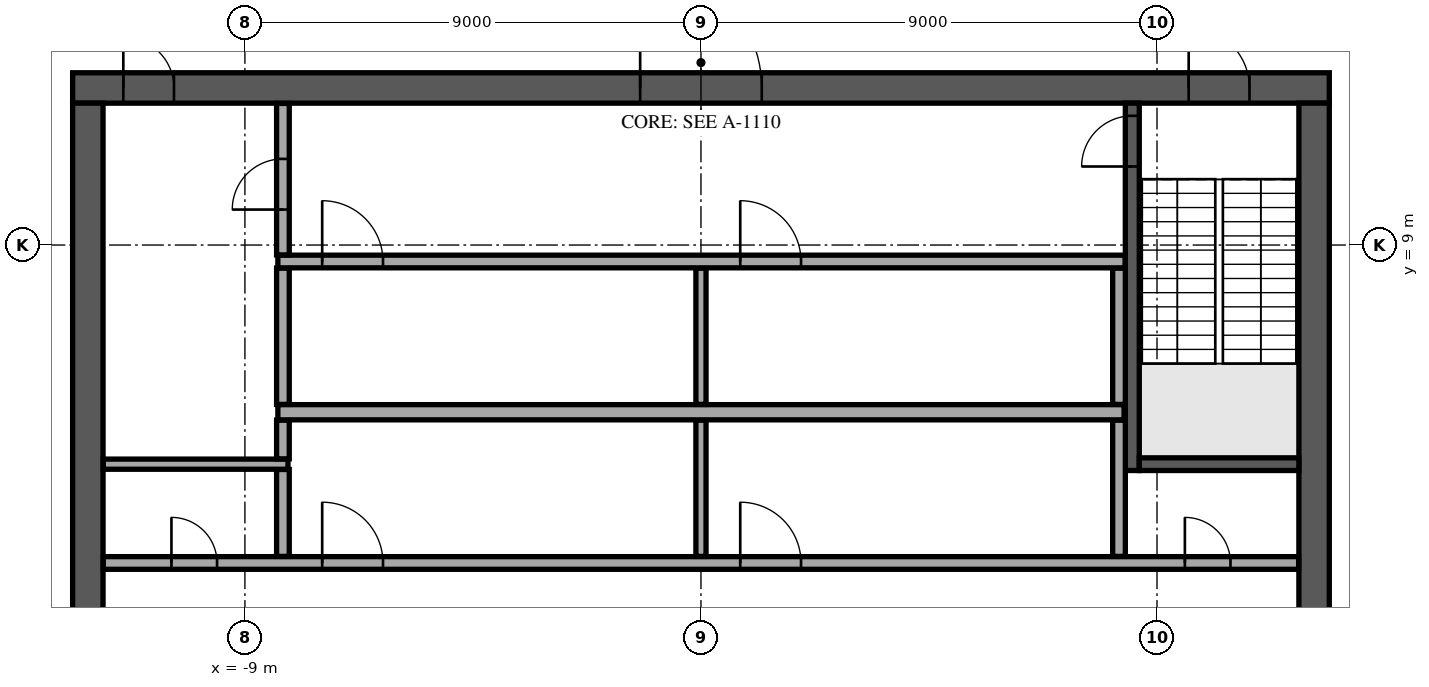
"""IFC4 building model, lengths in metres.
Left out: names, types, materials, properties, quantities, classifications, styles, units other than length and angle.
Written with IfcOpenShell. Run it as: python <this file> out.ifc"""

import sys

from ifc_helpers import new_model, si_unit, direction, frame, frame_2d, origin, place, context, subcontext, project, spatial, rectangle, extrude, element, fill, save


model = new_model("IFC4")
c1 = context("Model", 3, precision=1e-05, world=origin(), true_north=direction((0.0, 1.0)))
c2 = subcontext(c1, "Body", "Model", "MODEL_VIEW")
j1 = project(units=[si_unit("LENGTHUNIT", "METRE"), si_unit("PLANEANGLEUNIT", "RADIAN")], contexts=[c1])
p1 = place(None, origin())
s1 = spatial("IfcSite", under=j1, at=p1, CompositionType="ELEMENT")
p2 = place(p1, origin())
s2 = spatial("IfcBuilding", under=s1, at=p2, CompositionType="ELEMENT")
p3 = place(p2, frame((0.0, 0.0, 358.1)))
s3 = spatial("IfcBuildingStorey", under=s2, at=p3, CompositionType="ELEMENT", Elevation=358.1)
p4 = place(p3, frame((-12.4, 12.1, 0.0), z_axis=(0.0, 0.0, 1.0), x_axis=(1.0, 0.0, 0.0)))
e1 = element("IfcWall", 1, at=p4, inside=s3, PredefinedType="SHEAR", context=c2, shape_type="SweptSolid", body=[
    extrude(rectangle(XDim=24.8, YDim=0.6, at=frame_2d((12.4, 0.0))), origin(), (0.0, 0.0, 1.0), 4.7),
])
p5 = place(p4, frame((11.2, 0.0, 0.0)))
e2 = element("IfcOpeningElement", 2, at=p5, cuts=e1, PredefinedType="OPENING", context=c2, shape_type="SweptSolid", body=[
    extrude(rectangle(XDim=2.4, YDim=2.4, at=frame_2d((1.2, 1.2))), frame((0.0, 0.31, 0.0), z_axis=(0.0, -1.0, 0.0), x_axis=(1.0, 0.0, 0.0)), (0.0, 0.0, 1.0), 0.62),
])
p6 = place(p4, frame((22.025, 0.0, 0.0)))
e3 = element("IfcOpeningElement", 3, at=p6, cuts=e1, PredefinedType="OPENING", context=c2, shape_type="SweptSolid", body=[
    extrude(rectangle(XDim=1.2, YDim=2.1, at=frame_2d((0.6, 1.05))), frame((0.0, 0.31, 0.0), z_axis=(0.0, -1.0, 0.0), x_axis=(1.0, 0.0, 0.0)), (0.0, 0.0, 1.0), 0.62),
])
p7 = place(p4, frame((1.0, 0.0, 0.0)))
e4 = element("IfcOpeningElement", 4, at=p7, cuts=e1, PredefinedType="OPENING", context=c2, shape_type="SweptSolid", body=[
    extrude(rectangle(XDim=1.0, YDim=2.1, at=frame_2d((0.5, 1.05))), frame((0.0, 0.31, 0.0), z_axis=(0.0, -1.0, 0.0), x_axis=(1.0, 0.0, 0.0)), (0.0, 0.0, 1.0), 0.62),
])
p8 = place(p3, frame((12.1, -11.8, 0.0), z_axis=(0.0, 0.0, 1.0), x_axis=(0.0, 1.0, 0.0)))
e5 = element("IfcWall", 5, at=p8, inside=s3, PredefinedType="SHEAR", context=c2, shape_type="SweptSolid", body=[
    extrude(rectangle(XDim=23.6, YDim=0.6, at=frame_2d((11.8, 0.0))), origin(), (0.0, 0.0, 1.0), 4.7),
])
p9 = place(p8, frame((10.6, 0.0, 0.0)))
e6 = element("IfcOpeningElement", 6, at=p9, cuts=e5, PredefinedType="OPENING", context=c2, shape_type="SweptSolid", body=[
    extrude(rectangle(XDim=2.4, YDim=2.4, at=frame_2d((1.2, 1.2))), frame((0.0, 0.31, 0.0), z_axis=(0.0, -1.0, 0.0), x_axis=(1.0, 0.0, 0.0)), (0.0, 0.0, 1.0), 0.62),
])
p10 = place(p3, frame((-12.1, -11.8, 0.0), z_axis=(0.0, 0.0, 1.0), x_axis=(0.0, 1.0, 0.0)))
e7 = element("IfcWall", 7, at=p10, inside=s3, PredefinedType="SHEAR", context=c2, shape_type="SweptSolid", body=[
    extrude(rectangle(XDim=23.6, YDim=0.6, at=frame_2d((11.8, 0.0))), origin(), (0.0, 0.0, 1.0), 4.7),
])
p11 = place(p10, frame((10.6, 0.0, 0.0)))
e8 = element("IfcOpeningElement", 8, at=p11, cuts=e7, PredefinedType="OPENING", context=c2, shape_type="SweptSolid", body=[
    extrude(rectangle(XDim=2.4, YDim=2.4, at=frame_2d((1.2, 1.2))), frame((0.0, 0.31, 0.0), z_axis=(0.0, -1.0, 0.0), x_axis=(1.0, 0.0, 0.0)), (0.0, 0.0, 1.0), 0.62),
])
p12 = place(p3, frame((8.512, 4.55, 0.0), z_axis=(0.0, 0.0, 1.0), x_axis=(0.0, 1.0, 0.0)))
e9 = element("IfcWall", 9, at=p12, inside=s3, PredefinedType="SOLIDWALL", context=c2, shape_type="SweptSolid", body=[
    extrude(rectangle(XDim=7.25, YDim=0.275, at=frame_2d((3.625, 0.0))), origin(), (0.0, 0.0, 1.0), 4.7),
])
p13 = place(p12, frame((6.0, 0.0, 0.0)))
e10 = element("IfcOpeningElement", 10, at=p13, cuts=e9, PredefinedType="OPENING", context=c2, shape_type="SweptSolid", body=[
    extrude(rectangle(XDim=1.0, YDim=2.1, at=frame_2d((0.5, 1.05))), frame((0.0, 0.147, 0.0), z_axis=(0.0, -1.0, 0.0), x_axis=(1.0, 0.0, 0.0)), (0.0, 0.0, 1.0), 0.295),
])
p14 = place(p3, frame((8.65, 4.675, 0.0), z_axis=(0.0, 0.0, 1.0), x_axis=(1.0, 0.0, 0.0)))
e11 = element("IfcWall", 11, at=p14, inside=s3, PredefinedType="SOLIDWALL", context=c2, shape_type="SweptSolid", body=[
    extrude(rectangle(XDim=3.15, YDim=0.25, at=frame_2d((1.575, 0.0))), origin(), (0.0, 0.0, 1.0), 4.7),
])
p15 = place(p3, frame((-11.795, 2.725, 0.0), z_axis=(0.0, 0.0, 1.0), x_axis=(1.0, 0.0, 0.0)))
e12 = element("IfcWall", 12, at=p15, inside=s3, PredefinedType="PARTITIONING", context=c2, shape_type="SweptSolid", body=[
    extrude(rectangle(XDim=23.59, YDim=0.25, at=frame_2d((11.795, 0.0))), origin(), (0.0, 0.0, 1.0), 4.7),
])
p16 = place(p15, frame((21.345, 0.0, 0.0)))
e13 = element("IfcOpeningElement", 13, at=p16, cuts=e12, PredefinedType="OPENING", context=c2, shape_type="SweptSolid", body=[
    extrude(rectangle(XDim=0.9, YDim=2.1, at=frame_2d((0.45, 1.05))), frame((0.0, 0.135, 0.0), z_axis=(0.0, -1.0, 0.0), x_axis=(1.0, 0.0, 0.0)), (0.0, 0.0, 1.0), 0.27),
])
p17 = place(p15, frame((1.345, 0.0, 0.0)))
e14 = element("IfcOpeningElement", 14, at=p17, cuts=e12, PredefinedType="OPENING", context=c2, shape_type="SweptSolid", body=[
    extrude(rectangle(XDim=0.9, YDim=2.1, at=frame_2d((0.45, 1.05))), frame((0.0, 0.135, 0.0), z_axis=(0.0, -1.0, 0.0), x_axis=(1.0, 0.0, 0.0)), (0.0, 0.0, 1.0), 0.27),
])
p18 = place(p15, frame((4.32, 0.0, 0.0)))
e15 = element("IfcOpeningElement", 15, at=p18, cuts=e12, PredefinedType="OPENING", context=c2, shape_type="SweptSolid", body=[
    extrude(rectangle(XDim=1.2, YDim=2.1, at=frame_2d((0.6, 1.05))), frame((0.0, 0.135, 0.0), z_axis=(0.0, -1.0, 0.0), x_axis=(1.0, 0.0, 0.0)), (0.0, 0.0, 1.0), 0.27),
])
p19 = place(p15, frame((12.57, 0.0, 0.0)))
e16 = element("IfcOpeningElement", 16, at=p19, cuts=e12, PredefinedType="OPENING", context=c2, shape_type="SweptSolid", body=[
    extrude(rectangle(XDim=1.2, YDim=2.1, at=frame_2d((0.6, 1.05))), frame((0.0, 0.135, 0.0), z_axis=(0.0, -1.0, 0.0), x_axis=(1.0, 0.0, 0.0)), (0.0, 0.0, 1.0), 0.27),
])
p20 = place(p3, frame((-8.25, 2.855, 0.0), z_axis=(0.0, 0.0, 1.0), x_axis=(0.0, 1.0, 0.0)))
e17 = element("IfcWall", 17, at=p20, inside=s3, PredefinedType="PARTITIONING", context=c2, shape_type="SweptSolid", body=[
    extrude(rectangle(XDim=1.715, YDim=0.25, at=frame_2d((0.857, 0.0))), origin(), (0.0, 0.0, 1.0), 4.7),
])
p21 = place(p3, frame((0.0, 2.855, 0.0), z_axis=(0.0, 0.0, 1.0), x_axis=(0.0, 1.0, 0.0)))
e18 = element("IfcWall", 18, at=p21, inside=s3, PredefinedType="PARTITIONING", context=c2, shape_type="SweptSolid", body=[
    extrude(rectangle(XDim=2.69, YDim=0.2, at=frame_2d((1.345, 0.0))), origin(), (0.0, 0.0, 1.0), 4.7),
])
p22 = place(p3, frame((8.25, 2.855, 0.0), z_axis=(0.0, 0.0, 1.0), x_axis=(0.0, 1.0, 0.0)))
e19 = element("IfcWall", 19, at=p22, inside=s3, PredefinedType="PARTITIONING", context=c2, shape_type="SweptSolid", body=[
    extrude(rectangle(XDim=2.69, YDim=0.25, at=frame_2d((1.345, 0.0))), origin(), (0.0, 0.0, 1.0), 4.7),
])
p23 = place(p3, frame((-11.795, 4.675, 0.0), z_axis=(0.0, 0.0, 1.0), x_axis=(1.0, 0.0, 0.0)))
e20 = element("IfcWall", 20, at=p23, inside=s3, PredefinedType="PARTITIONING", context=c2, shape_type="SweptSolid", body=[
    extrude(rectangle(XDim=3.645, YDim=0.2, at=frame_2d((1.823, 0.0))), origin(), (0.0, 0.0, 1.0), 4.7),
])
p24 = place(p3, frame((-8.25, 4.78, 0.0), z_axis=(0.0, 0.0, 1.0), x_axis=(0.0, 1.0, 0.0)))
e21 = element("IfcWall", 21, at=p24, inside=s3, PredefinedType="PARTITIONING", context=c2, shape_type="SweptSolid", body=[
    extrude(rectangle(XDim=0.765, YDim=0.25, at=frame_2d((0.382, 0.0))), origin(), (0.0, 0.0, 1.0), 4.7),
])
p25 = place(p3, frame((-8.35, 5.7, 0.0), z_axis=(0.0, 0.0, 1.0), x_axis=(1.0, 0.0, 0.0)))
e22 = element("IfcWall", 22, at=p25, inside=s3, PredefinedType="PARTITIONING", context=c2, shape_type="SweptSolid", body=[
    extrude(rectangle(XDim=16.7, YDim=0.3, at=frame_2d((8.35, 0.0))), origin(), (0.0, 0.0, 1.0), 4.7),
])
p26 = place(p3, frame((-8.25, 5.855, 0.0), z_axis=(0.0, 0.0, 1.0), x_axis=(0.0, 1.0, 0.0)))
e23 = element("IfcWall", 23, at=p26, inside=s3, PredefinedType="PARTITIONING", context=c2, shape_type="SweptSolid", body=[
    extrude(rectangle(XDim=2.69, YDim=0.25, at=frame_2d((1.345, 0.0))), origin(), (0.0, 0.0, 1.0), 4.7),
])
p27 = place(p3, frame((0.0, 5.855, 0.0), z_axis=(0.0, 0.0, 1.0), x_axis=(0.0, 1.0, 0.0)))
e24 = element("IfcWall", 24, at=p27, inside=s3, PredefinedType="PARTITIONING", context=c2, shape_type="SweptSolid", body=[
    extrude(rectangle(XDim=2.69, YDim=0.2, at=frame_2d((1.345, 0.0))), origin(), (0.0, 0.0, 1.0), 4.7),
])
p28 = place(p3, frame((8.25, 5.855, 0.0), z_axis=(0.0, 0.0, 1.0), x_axis=(0.0, 1.0, 0.0)))
e25 = element("IfcWall", 25, at=p28, inside=s3, PredefinedType="PARTITIONING", context=c2, shape_type="SweptSolid", body=[
    extrude(rectangle(XDim=2.69, YDim=0.25, at=frame_2d((1.345, 0.0))), origin(), (0.0, 0.0, 1.0), 4.7),
])
p29 = place(p3, frame((-8.35, 8.675, 0.0), z_axis=(0.0, 0.0, 1.0), x_axis=(1.0, 0.0, 0.0)))
e26 = element("IfcWall", 26, at=p29, inside=s3, PredefinedType="PARTITIONING", context=c2, shape_type="SweptSolid", body=[
    extrude(rectangle(XDim=16.72, YDim=0.25, at=frame_2d((8.36, 0.0))), origin(), (0.0, 0.0, 1.0), 4.7),
])
p30 = place(p29, frame((0.875, 0.0, 0.0)))
e27 = element("IfcOpeningElement", 27, at=p30, cuts=e26, PredefinedType="OPENING", context=c2, shape_type="SweptSolid", body=[
    extrude(rectangle(XDim=1.2, YDim=2.1, at=frame_2d((0.6, 1.05))), frame((0.0, 0.135, 0.0), z_axis=(0.0, -1.0, 0.0), x_axis=(1.0, 0.0, 0.0)), (0.0, 0.0, 1.0), 0.27),
])
p31 = place(p29, frame((9.125, 0.0, 0.0)))
e28 = element("IfcOpeningElement", 28, at=p31, cuts=e26, PredefinedType="OPENING", context=c2, shape_type="SweptSolid", body=[
    extrude(rectangle(XDim=1.2, YDim=2.1, at=frame_2d((0.6, 1.05))), frame((0.0, 0.135, 0.0), z_axis=(0.0, -1.0, 0.0), x_axis=(1.0, 0.0, 0.0)), (0.0, 0.0, 1.0), 0.27),
])
p32 = place(p3, frame((-8.25, 8.805, 0.0), z_axis=(0.0, 0.0, 1.0), x_axis=(0.0, 1.0, 0.0)))
e29 = element("IfcWall", 29, at=p32, inside=s3, PredefinedType="PARTITIONING", context=c2, shape_type="SweptSolid", body=[
    extrude(rectangle(XDim=2.99, YDim=0.25, at=frame_2d((1.495, 0.0))), origin(), (0.0, 0.0, 1.0), 4.7),
])
p33 = place(p32, frame((0.895, 0.0, 0.0)))
e30 = element("IfcOpeningElement", 30, at=p33, cuts=e29, PredefinedType="OPENING", context=c2, shape_type="SweptSolid", body=[
    extrude(rectangle(XDim=1.0, YDim=2.1, at=frame_2d((0.5, 1.05))), frame((0.0, 0.135, 0.0), z_axis=(0.0, -1.0, 0.0), x_axis=(1.0, 0.0, 0.0)), (0.0, 0.0, 1.0), 0.27),
])
p34 = place(p5, origin())
e31 = element("IfcDoor", 31, at=p34, inside=s3, OperationType="SINGLE_SWING_LEFT", PredefinedType="DOOR", context=c2, shape_type="SweptSolid", body=[
    extrude(rectangle(XDim=2.4, YDim=2.4, at=frame_2d((1.2, 1.2))), frame((0.0, 0.025, 0.0), z_axis=(0.0, -1.0, 0.0), x_axis=(1.0, 0.0, 0.0)), (0.0, 0.0, 1.0), 0.05),
])
fill(e2, e31)
p35 = place(p6, origin())
e32 = element("IfcDoor", 32, at=p35, inside=s3, OperationType="SINGLE_SWING_LEFT", PredefinedType="DOOR", context=c2, shape_type="SweptSolid", body=[
    extrude(rectangle(XDim=1.2, YDim=2.1, at=frame_2d((0.6, 1.05))), frame((0.0, 0.025, 0.0), z_axis=(0.0, -1.0, 0.0), x_axis=(1.0, 0.0, 0.0)), (0.0, 0.0, 1.0), 0.05),
])
fill(e3, e32)
p36 = place(p7, origin())
e33 = element("IfcDoor", 33, at=p36, inside=s3, OperationType="SINGLE_SWING_LEFT", PredefinedType="DOOR", context=c2, shape_type="SweptSolid", body=[
    extrude(rectangle(XDim=1.0, YDim=2.1, at=frame_2d((0.5, 1.05))), frame((0.0, 0.025, 0.0), z_axis=(0.0, -1.0, 0.0), x_axis=(1.0, 0.0, 0.0)), (0.0, 0.0, 1.0), 0.05),
])
fill(e4, e33)
p37 = place(p13, origin())
e34 = element("IfcDoor", 34, at=p37, inside=s3, OperationType="SINGLE_SWING_LEFT", PredefinedType="DOOR", context=c2, shape_type="SweptSolid", body=[
    extrude(rectangle(XDim=1.0, YDim=2.1, at=frame_2d((0.5, 1.05))), frame((0.0, 0.025, 0.0), z_axis=(0.0, -1.0, 0.0), x_axis=(1.0, 0.0, 0.0)), (0.0, 0.0, 1.0), 0.05),
])
fill(e10, e34)
p38 = place(p16, origin())
e35 = element("IfcDoor", 35, at=p38, inside=s3, OperationType="SINGLE_SWING_LEFT", PredefinedType="DOOR", context=c2, shape_type="SweptSolid", body=[
    extrude(rectangle(XDim=0.9, YDim=2.1, at=frame_2d((0.45, 1.05))), frame((0.0, 0.025, 0.0), z_axis=(0.0, -1.0, 0.0), x_axis=(1.0, 0.0, 0.0)), (0.0, 0.0, 1.0), 0.05),
])
fill(e13, e35)
p39 = place(p17, origin())
e36 = element("IfcDoor", 36, at=p39, inside=s3, OperationType="SINGLE_SWING_LEFT", PredefinedType="DOOR", context=c2, shape_type="SweptSolid", body=[
    extrude(rectangle(XDim=0.9, YDim=2.1, at=frame_2d((0.45, 1.05))), frame((0.0, 0.025, 0.0), z_axis=(0.0, -1.0, 0.0), x_axis=(1.0, 0.0, 0.0)), (0.0, 0.0, 1.0), 0.05),
])
fill(e14, e36)
p40 = place(p33, origin())
e37 = element("IfcDoor", 37, at=p40, inside=s3, OperationType="SINGLE_SWING_LEFT", PredefinedType="DOOR", context=c2, shape_type="SweptSolid", body=[
    extrude(rectangle(XDim=1.0, YDim=2.1, at=frame_2d((0.5, 1.05))), frame((0.0, 0.025, 0.0), z_axis=(0.0, -1.0, 0.0), x_axis=(1.0, 0.0, 0.0)), (0.0, 0.0, 1.0), 0.05),
])
fill(e30, e37)
p41 = place(p18, origin())
e38 = element("IfcDoor", 38, at=p41, inside=s3, OperationType="SINGLE_SWING_LEFT", PredefinedType="DOOR", context=c2, shape_type="SweptSolid", body=[
    extrude(rectangle(XDim=1.2, YDim=2.1, at=frame_2d((0.6, 1.05))), frame((0.0, 0.025, 0.0), z_axis=(0.0, -1.0, 0.0), x_axis=(1.0, 0.0, 0.0)), (0.0, 0.0, 1.0), 0.05),
])
fill(e15, e38)
p42 = place(p19, origin())
e39 = element("IfcDoor", 39, at=p42, inside=s3, OperationType="SINGLE_SWING_LEFT", PredefinedType="DOOR", context=c2, shape_type="SweptSolid", body=[
    extrude(rectangle(XDim=1.2, YDim=2.1, at=frame_2d((0.6, 1.05))), frame((0.0, 0.025, 0.0), z_axis=(0.0, -1.0, 0.0), x_axis=(1.0, 0.0, 0.0)), (0.0, 0.0, 1.0), 0.05),
])
fill(e16, e39)
p43 = place(p30, origin())
e40 = element("IfcDoor", 40, at=p43, inside=s3, OperationType="SINGLE_SWING_LEFT", PredefinedType="DOOR", context=c2, shape_type="SweptSolid", body=[
    extrude(rectangle(XDim=1.2, YDim=2.1, at=frame_2d((0.6, 1.05))), frame((0.0, 0.025, 0.0), z_axis=(0.0, -1.0, 0.0), x_axis=(1.0, 0.0, 0.0)), (0.0, 0.0, 1.0), 0.05),
])
fill(e27, e40)
p44 = place(p31, origin())
e41 = element("IfcDoor", 41, at=p44, inside=s3, OperationType="SINGLE_SWING_LEFT", PredefinedType="DOOR", context=c2, shape_type="SweptSolid", body=[
    extrude(rectangle(XDim=1.2, YDim=2.1, at=frame_2d((0.6, 1.05))), frame((0.0, 0.025, 0.0), z_axis=(0.0, -1.0, 0.0), x_axis=(1.0, 0.0, 0.0)), (0.0, 0.0, 1.0), 0.05),
])
fill(e28, e41)
save(model, sys.argv[1])
